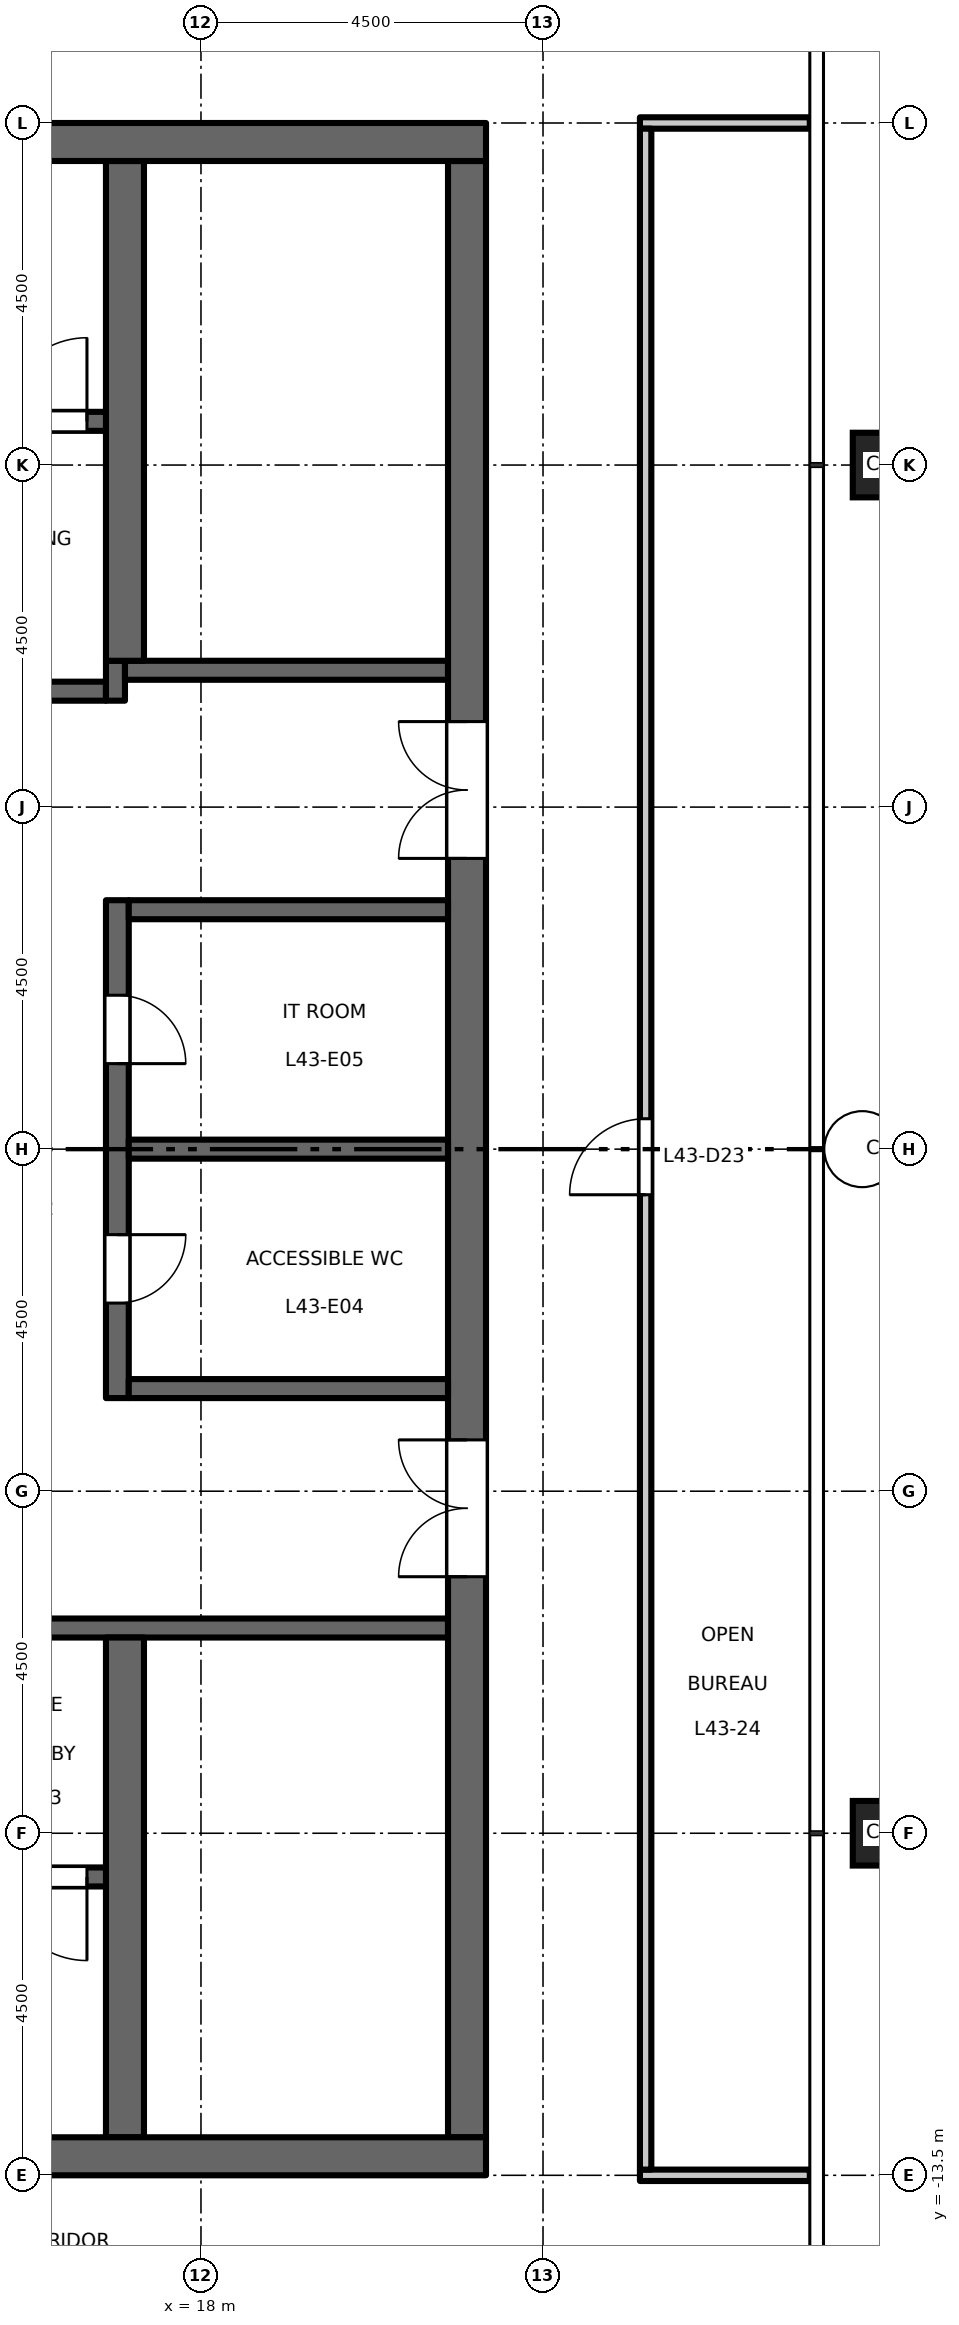
"""IFC4 building model, lengths in metres.
Left out: names, types, materials, properties, quantities, classifications, styles, units other than length and angle.
Written with IfcOpenShell. Run it as: python <this file> out.ifc"""

import sys

from ifc_helpers import new_model, si_unit, direction, frame, frame_2d, origin, origin_2d, place, context, subcontext, project, spatial, rectangle, hollow_rectangle, extrude, element, fill, save


model = new_model("IFC4")
c1 = context("Model", 3, precision=1e-05, world=origin(), true_north=direction((0.0, 1.0)))
c2 = subcontext(c1, "Body", "Model", "MODEL_VIEW")
j1 = project(units=[si_unit("LENGTHUNIT", "METRE"), si_unit("PLANEANGLEUNIT", "RADIAN")], contexts=[c1])
p1 = place(None, origin())
s1 = spatial("IfcSite", under=j1, at=p1, CompositionType="ELEMENT")
p2 = place(p1, origin())
s2 = spatial("IfcBuilding", under=s1, at=p2, CompositionType="ELEMENT")
p3 = place(p2, frame((0.0, 0.0, 201.7)))
s3 = spatial("IfcBuildingStorey", under=s2, at=p3, CompositionType="ELEMENT", Elevation=201.7)
for number, where, z_axis, x_axis in (
    (1, (27.0, -9.0, 0.0), (0.0, 0.0, 1.0), (1.0, 0.0, 0.0)),
    (2, (27.0, 0.0, 0.0), (0.0, 0.0, 1.0), (1.0, 0.0, 0.0)),
    (3, (27.0, 9.0, 0.0), (0.0, 0.0, 1.0), (1.0, 0.0, 0.0)),
):
    element("IfcColumn", number, at=place(p3, frame(where, z_axis=z_axis, x_axis=x_axis)), inside=s3, PredefinedType="COLUMN", context=c2, shape_type="SweptSolid", body=[
        extrude(hollow_rectangle(XDim=0.85, YDim=0.85, WallThickness=0.05, at=origin_2d()), origin(), (0.0, 0.0, 1.0), 4.5),
    ])
p4 = place(p3, frame((12.15, 6.025, 0.0), z_axis=(0.0, 0.0, 1.0), x_axis=(1.0, 0.0, 0.0)))
e4 = element("IfcWall", 4, at=p4, inside=s3, PredefinedType="SHEAR", context=c2, shape_type="SweptSolid", body=[
    extrude(rectangle(XDim=4.6, YDim=0.25, at=frame_2d((2.3, 0.0))), origin(), (0.0, 0.0, 1.0), 4.35),
])
p5 = place(p4, frame((1.8, 0.0, 0.0)))
e5 = element("IfcOpeningElement", 5, at=p5, cuts=e4, PredefinedType="OPENING", context=c2, shape_type="SweptSolid", body=[
    extrude(rectangle(XDim=1.0, YDim=2.1, at=frame_2d((0.5, 1.05))), frame((0.0, 0.135, 0.0), z_axis=(0.0, -1.0, 0.0), x_axis=(1.0, 0.0, 0.0)), (0.0, 0.0, 1.0), 0.27),
])
p6 = place(p3, frame((16.875, 5.9, 0.0), z_axis=(0.0, 0.0, 1.0), x_axis=(0.0, 1.0, 0.0)))
e6 = element("IfcWall", 6, at=p6, inside=s3, PredefinedType="SHEAR", context=c2, shape_type="SweptSolid", body=[
    extrude(rectangle(XDim=0.525, YDim=0.25, at=frame_2d((0.263, 0.0))), origin(), (0.0, 0.0, 1.0), 4.35),
])
p7 = place(p3, frame((17.0, 6.3, 0.0), z_axis=(0.0, 0.0, 1.0), x_axis=(1.0, 0.0, 0.0)))
e7 = element("IfcWall", 7, at=p7, inside=s3, PredefinedType="SHEAR", context=c2, shape_type="SweptSolid", body=[
    extrude(rectangle(XDim=4.25, YDim=0.25, at=frame_2d((2.125, 0.0))), origin(), (0.0, 0.0, 1.0), 4.35),
])
p8 = place(p3, frame((12.15, -6.3, 0.0), z_axis=(0.0, 0.0, 1.0), x_axis=(1.0, 0.0, 0.0)))
e8 = element("IfcWall", 8, at=p8, inside=s3, PredefinedType="SHEAR", context=c2, shape_type="SweptSolid", body=[
    extrude(rectangle(XDim=9.1, YDim=0.25, at=frame_2d((4.55, 0.0))), origin(), (0.0, 0.0, 1.0), 4.35),
])
p9 = place(p8, frame((1.8, 0.0, 0.0)))
e9 = element("IfcOpeningElement", 9, at=p9, cuts=e8, PredefinedType="OPENING", context=c2, shape_type="SweptSolid", body=[
    extrude(rectangle(XDim=1.0, YDim=2.1, at=frame_2d((0.5, 1.05))), frame((0.0, 0.135, 0.0), z_axis=(0.0, -1.0, 0.0), x_axis=(1.0, 0.0, 0.0)), (0.0, 0.0, 1.0), 0.27),
])
p10 = place(p3, frame((21.5, -13.0, 0.0), z_axis=(0.0, 0.0, 1.0), x_axis=(0.0, 1.0, 0.0)))
e10 = element("IfcWall", 10, at=p10, inside=s3, PredefinedType="SHEAR", context=c2, shape_type="SweptSolid", body=[
    extrude(rectangle(XDim=26.0, YDim=0.5, at=frame_2d((13.0, 0.0))), origin(), (0.0, 0.0, 1.0), 4.35),
])
p11 = place(p10, frame((16.825, 0.0, 0.0)))
e11 = element("IfcOpeningElement", 11, at=p11, cuts=e10, PredefinedType="OPENING", context=c2, shape_type="SweptSolid", body=[
    extrude(rectangle(XDim=1.8, YDim=2.1, at=frame_2d((0.9, 1.05))), frame((0.0, 0.26, 0.0), z_axis=(0.0, -1.0, 0.0), x_axis=(1.0, 0.0, 0.0)), (0.0, 0.0, 1.0), 0.52),
])
p12 = place(p10, frame((7.375, 0.0, 0.0)))
e12 = element("IfcOpeningElement", 12, at=p12, cuts=e10, PredefinedType="OPENING", context=c2, shape_type="SweptSolid", body=[
    extrude(rectangle(XDim=1.8, YDim=2.1, at=frame_2d((0.9, 1.05))), frame((0.0, 0.26, 0.0), z_axis=(0.0, -1.0, 0.0), x_axis=(1.0, 0.0, 0.0)), (0.0, 0.0, 1.0), 0.52),
])
p13 = place(p3, frame((16.9, -3.275, 0.0), z_axis=(0.0, 0.0, 1.0), x_axis=(0.0, 1.0, 0.0)))
e13 = element("IfcWall", 13, at=p13, inside=s3, PredefinedType="SHEAR", context=c2, shape_type="SweptSolid", body=[
    extrude(rectangle(XDim=6.55, YDim=0.3, at=frame_2d((3.275, 0.0))), origin(), (0.0, 0.0, 1.0), 4.35),
])
p14 = place(p13, frame((1.25, 0.0, 0.0)))
e14 = element("IfcOpeningElement", 14, at=p14, cuts=e13, PredefinedType="OPENING", context=c2, shape_type="SweptSolid", body=[
    extrude(rectangle(XDim=0.9, YDim=2.1, at=frame_2d((0.45, 1.05))), frame((0.0, 0.16, 0.0), z_axis=(0.0, -1.0, 0.0), x_axis=(1.0, 0.0, 0.0)), (0.0, 0.0, 1.0), 0.32),
])
p15 = place(p13, frame((4.4, 0.0, 0.0)))
e15 = element("IfcOpeningElement", 15, at=p15, cuts=e13, PredefinedType="OPENING", context=c2, shape_type="SweptSolid", body=[
    extrude(rectangle(XDim=0.9, YDim=2.1, at=frame_2d((0.45, 1.05))), frame((0.0, 0.16, 0.0), z_axis=(0.0, -1.0, 0.0), x_axis=(1.0, 0.0, 0.0)), (0.0, 0.0, 1.0), 0.32),
])
for number, where, z_axis, x_axis in (
    (16, (17.05, 0.0, 0.0), (0.0, 0.0, 1.0), (1.0, 0.0, 0.0)),
    (17, (17.05, 3.15, 0.0), (0.0, 0.0, 1.0), (1.0, 0.0, 0.0)),
    (18, (17.05, -3.15, 0.0), (0.0, 0.0, 1.0), (1.0, 0.0, 0.0)),
):
    element("IfcWall", number, at=place(p3, frame(where, z_axis=z_axis, x_axis=x_axis)), inside=s3, PredefinedType="SHEAR", context=c2, shape_type="SweptSolid", body=[
        extrude(rectangle(XDim=4.2, YDim=0.25, at=frame_2d((2.1, 0.0))), origin(), (0.0, 0.0, 1.0), 4.35),
    ])
for number, where, z_axis, x_axis in (
    (19, (17.0, 6.425, 0.0), (0.0, 0.0, 1.0), (0.0, 1.0, 0.0)),
    (20, (17.0, -13.0, 0.0), (0.0, 0.0, 1.0), (0.0, 1.0, 0.0)),
):
    element("IfcWall", number, at=place(p3, frame(where, z_axis=z_axis, x_axis=x_axis)), inside=s3, PredefinedType="SHEAR", context=c2, shape_type="SweptSolid", body=[
        extrude(rectangle(XDim=6.575, YDim=0.5, at=frame_2d((3.288, 0.0))), origin(), (0.0, 0.0, 1.0), 4.35),
    ])
p16 = place(p3, frame((8.75, 9.575, 0.0), z_axis=(0.0, 0.0, 1.0), x_axis=(1.0, 0.0, 0.0)))
e21 = element("IfcWall", 21, at=p16, inside=s3, PredefinedType="SHEAR", context=c2, shape_type="SweptSolid", body=[
    extrude(rectangle(XDim=8.0, YDim=0.25, at=frame_2d((4.0, 0.0))), origin(), (0.0, 0.0, 1.0), 4.35),
])
p17 = place(p16, frame((6.65, 0.0, 0.0)))
e22 = element("IfcOpeningElement", 22, at=p17, cuts=e21, PredefinedType="OPENING", context=c2, shape_type="SweptSolid", body=[
    extrude(rectangle(XDim=1.1, YDim=2.1, at=frame_2d((0.55, 1.05))), frame((0.0, 0.135, 0.0), z_axis=(0.0, -1.0, 0.0), x_axis=(1.0, 0.0, 0.0)), (0.0, 0.0, 1.0), 0.27),
])
p18 = place(p3, frame((8.75, -9.575, 0.0), z_axis=(0.0, 0.0, 1.0), x_axis=(1.0, 0.0, 0.0)))
e23 = element("IfcWall", 23, at=p18, inside=s3, PredefinedType="SHEAR", context=c2, shape_type="SweptSolid", body=[
    extrude(rectangle(XDim=8.0, YDim=0.25, at=frame_2d((4.0, 0.0))), origin(), (0.0, 0.0, 1.0), 4.35),
])
p19 = place(p18, frame((6.65, 0.0, 0.0)))
e24 = element("IfcOpeningElement", 24, at=p19, cuts=e23, PredefinedType="OPENING", context=c2, shape_type="SweptSolid", body=[
    extrude(rectangle(XDim=1.1, YDim=2.1, at=frame_2d((0.55, 1.05))), frame((0.0, 0.135, 0.0), z_axis=(0.0, -1.0, 0.0), x_axis=(1.0, 0.0, 0.0)), (0.0, 0.0, 1.0), 0.27),
])
for number, where, z_axis, x_axis in (
    (25, (8.25, 13.25, 0.0), (0.0, 0.0, 1.0), (1.0, 0.0, 0.0)),
    (26, (8.25, -13.25, 0.0), (0.0, 0.0, 1.0), (1.0, 0.0, 0.0)),
):
    element("IfcWall", number, at=place(p3, frame(where, z_axis=z_axis, x_axis=x_axis)), inside=s3, PredefinedType="SHEAR", context=c2, shape_type="SweptSolid", body=[
        extrude(rectangle(XDim=13.5, YDim=0.5, at=frame_2d((6.75, 0.0))), origin(), (0.0, 0.0, 1.0), 4.35),
    ])
p20 = place(p3, frame((23.775, -13.5, 0.0), z_axis=(0.0, 0.0, 1.0), x_axis=(1.0, 0.0, 0.0)))
e27 = element("IfcWall", 27, at=p20, inside=s3, PredefinedType="PARTITIONING", context=c2, shape_type="SweptSolid", body=[
    extrude(rectangle(XDim=2.235, YDim=0.15, at=frame_2d((1.118, 0.0))), origin(), (0.0, 0.0, 1.0), 3.95),
])
p21 = place(p3, frame((23.775, 13.5, 0.0), z_axis=(0.0, 0.0, 1.0), x_axis=(1.0, 0.0, 0.0)))
e28 = element("IfcWall", 28, at=p21, inside=s3, PredefinedType="PARTITIONING", context=c2, shape_type="SweptSolid", body=[
    extrude(rectangle(XDim=2.235, YDim=0.15, at=frame_2d((1.118, 0.0))), origin(), (0.0, 0.0, 1.0), 4.35),
])
p22 = place(p3, frame((23.85, -13.425, 0.0), z_axis=(0.0, 0.0, 1.0), x_axis=(0.0, 1.0, 0.0)))
e29 = element("IfcWall", 29, at=p22, inside=s3, PredefinedType="PARTITIONING", context=c2, shape_type="SweptSolid", body=[
    extrude(rectangle(XDim=26.85, YDim=0.15, at=frame_2d((13.425, 0.0))), origin(), (0.0, 0.0, 1.0), 4.35),
])
p23 = place(p22, frame((12.825, 0.0, 0.0)))
e30 = element("IfcOpeningElement", 30, at=p23, cuts=e29, PredefinedType="OPENING", context=c2, shape_type="SweptSolid", body=[
    extrude(rectangle(XDim=1.0, YDim=2.1, at=frame_2d((0.5, 1.05))), frame((0.0, 0.085, 0.0), z_axis=(0.0, -1.0, 0.0), x_axis=(1.0, 0.0, 0.0)), (0.0, 0.0, 1.0), 0.17),
])
p24 = place(p17, origin())
e31 = element("IfcDoor", 31, at=p24, inside=s3, OperationType="SINGLE_SWING_LEFT", PredefinedType="DOOR", context=c2, shape_type="SweptSolid", body=[
    extrude(rectangle(XDim=1.1, YDim=2.1, at=frame_2d((0.55, 1.05))), frame((0.0, 0.025, 0.0), z_axis=(0.0, -1.0, 0.0), x_axis=(1.0, 0.0, 0.0)), (0.0, 0.0, 1.0), 0.05),
])
fill(e22, e31)
p25 = place(p19, origin())
e32 = element("IfcDoor", 32, at=p25, inside=s3, OperationType="SINGLE_SWING_RIGHT", PredefinedType="DOOR", context=c2, shape_type="SweptSolid", body=[
    extrude(rectangle(XDim=1.1, YDim=2.1, at=frame_2d((0.55, 1.05))), frame((0.0, 0.025, 0.0), z_axis=(0.0, -1.0, 0.0), x_axis=(1.0, 0.0, 0.0)), (0.0, 0.0, 1.0), 0.05),
])
fill(e24, e32)
p26 = place(p11, origin())
e33 = element("IfcDoor", 33, at=p26, inside=s3, OperationType="DOUBLE_DOOR_DOUBLE_SWING", PredefinedType="DOOR", context=c2, shape_type="SweptSolid", body=[
    extrude(rectangle(XDim=1.8, YDim=2.1, at=frame_2d((0.9, 1.05))), frame((0.0, 0.025, 0.0), z_axis=(0.0, -1.0, 0.0), x_axis=(1.0, 0.0, 0.0)), (0.0, 0.0, 1.0), 0.05),
])
fill(e11, e33)
p27 = place(p12, origin())
e34 = element("IfcDoor", 34, at=p27, inside=s3, OperationType="DOUBLE_DOOR_DOUBLE_SWING", PredefinedType="DOOR", context=c2, shape_type="SweptSolid", body=[
    extrude(rectangle(XDim=1.8, YDim=2.1, at=frame_2d((0.9, 1.05))), frame((0.0, 0.025, 0.0), z_axis=(0.0, -1.0, 0.0), x_axis=(1.0, 0.0, 0.0)), (0.0, 0.0, 1.0), 0.05),
])
fill(e12, e34)
p28 = place(p14, origin())
e35 = element("IfcDoor", 35, at=p28, inside=s3, OperationType="SINGLE_SWING_RIGHT", PredefinedType="DOOR", context=c2, shape_type="SweptSolid", body=[
    extrude(rectangle(XDim=0.9, YDim=2.1, at=frame_2d((0.45, 1.05))), frame((0.0, 0.025, 0.0), z_axis=(0.0, -1.0, 0.0), x_axis=(1.0, 0.0, 0.0)), (0.0, 0.0, 1.0), 0.05),
])
fill(e14, e35)
p29 = place(p15, origin())
e36 = element("IfcDoor", 36, at=p29, inside=s3, OperationType="SINGLE_SWING_LEFT", PredefinedType="DOOR", context=c2, shape_type="SweptSolid", body=[
    extrude(rectangle(XDim=0.9, YDim=2.1, at=frame_2d((0.45, 1.05))), frame((0.0, 0.025, 0.0), z_axis=(0.0, -1.0, 0.0), x_axis=(1.0, 0.0, 0.0)), (0.0, 0.0, 1.0), 0.05),
])
fill(e15, e36)
p30 = place(p23, origin())
e37 = element("IfcDoor", 37, at=p30, inside=s3, OperationType="SINGLE_SWING_LEFT", PredefinedType="DOOR", context=c2, shape_type="SweptSolid", body=[
    extrude(rectangle(XDim=1.0, YDim=2.1, at=frame_2d((0.5, 1.05))), frame((0.0, 0.025, 0.0), z_axis=(0.0, -1.0, 0.0), x_axis=(1.0, 0.0, 0.0)), (0.0, 0.0, 1.0), 0.05),
])
fill(e30, e37)
save(model, sys.argv[1])
